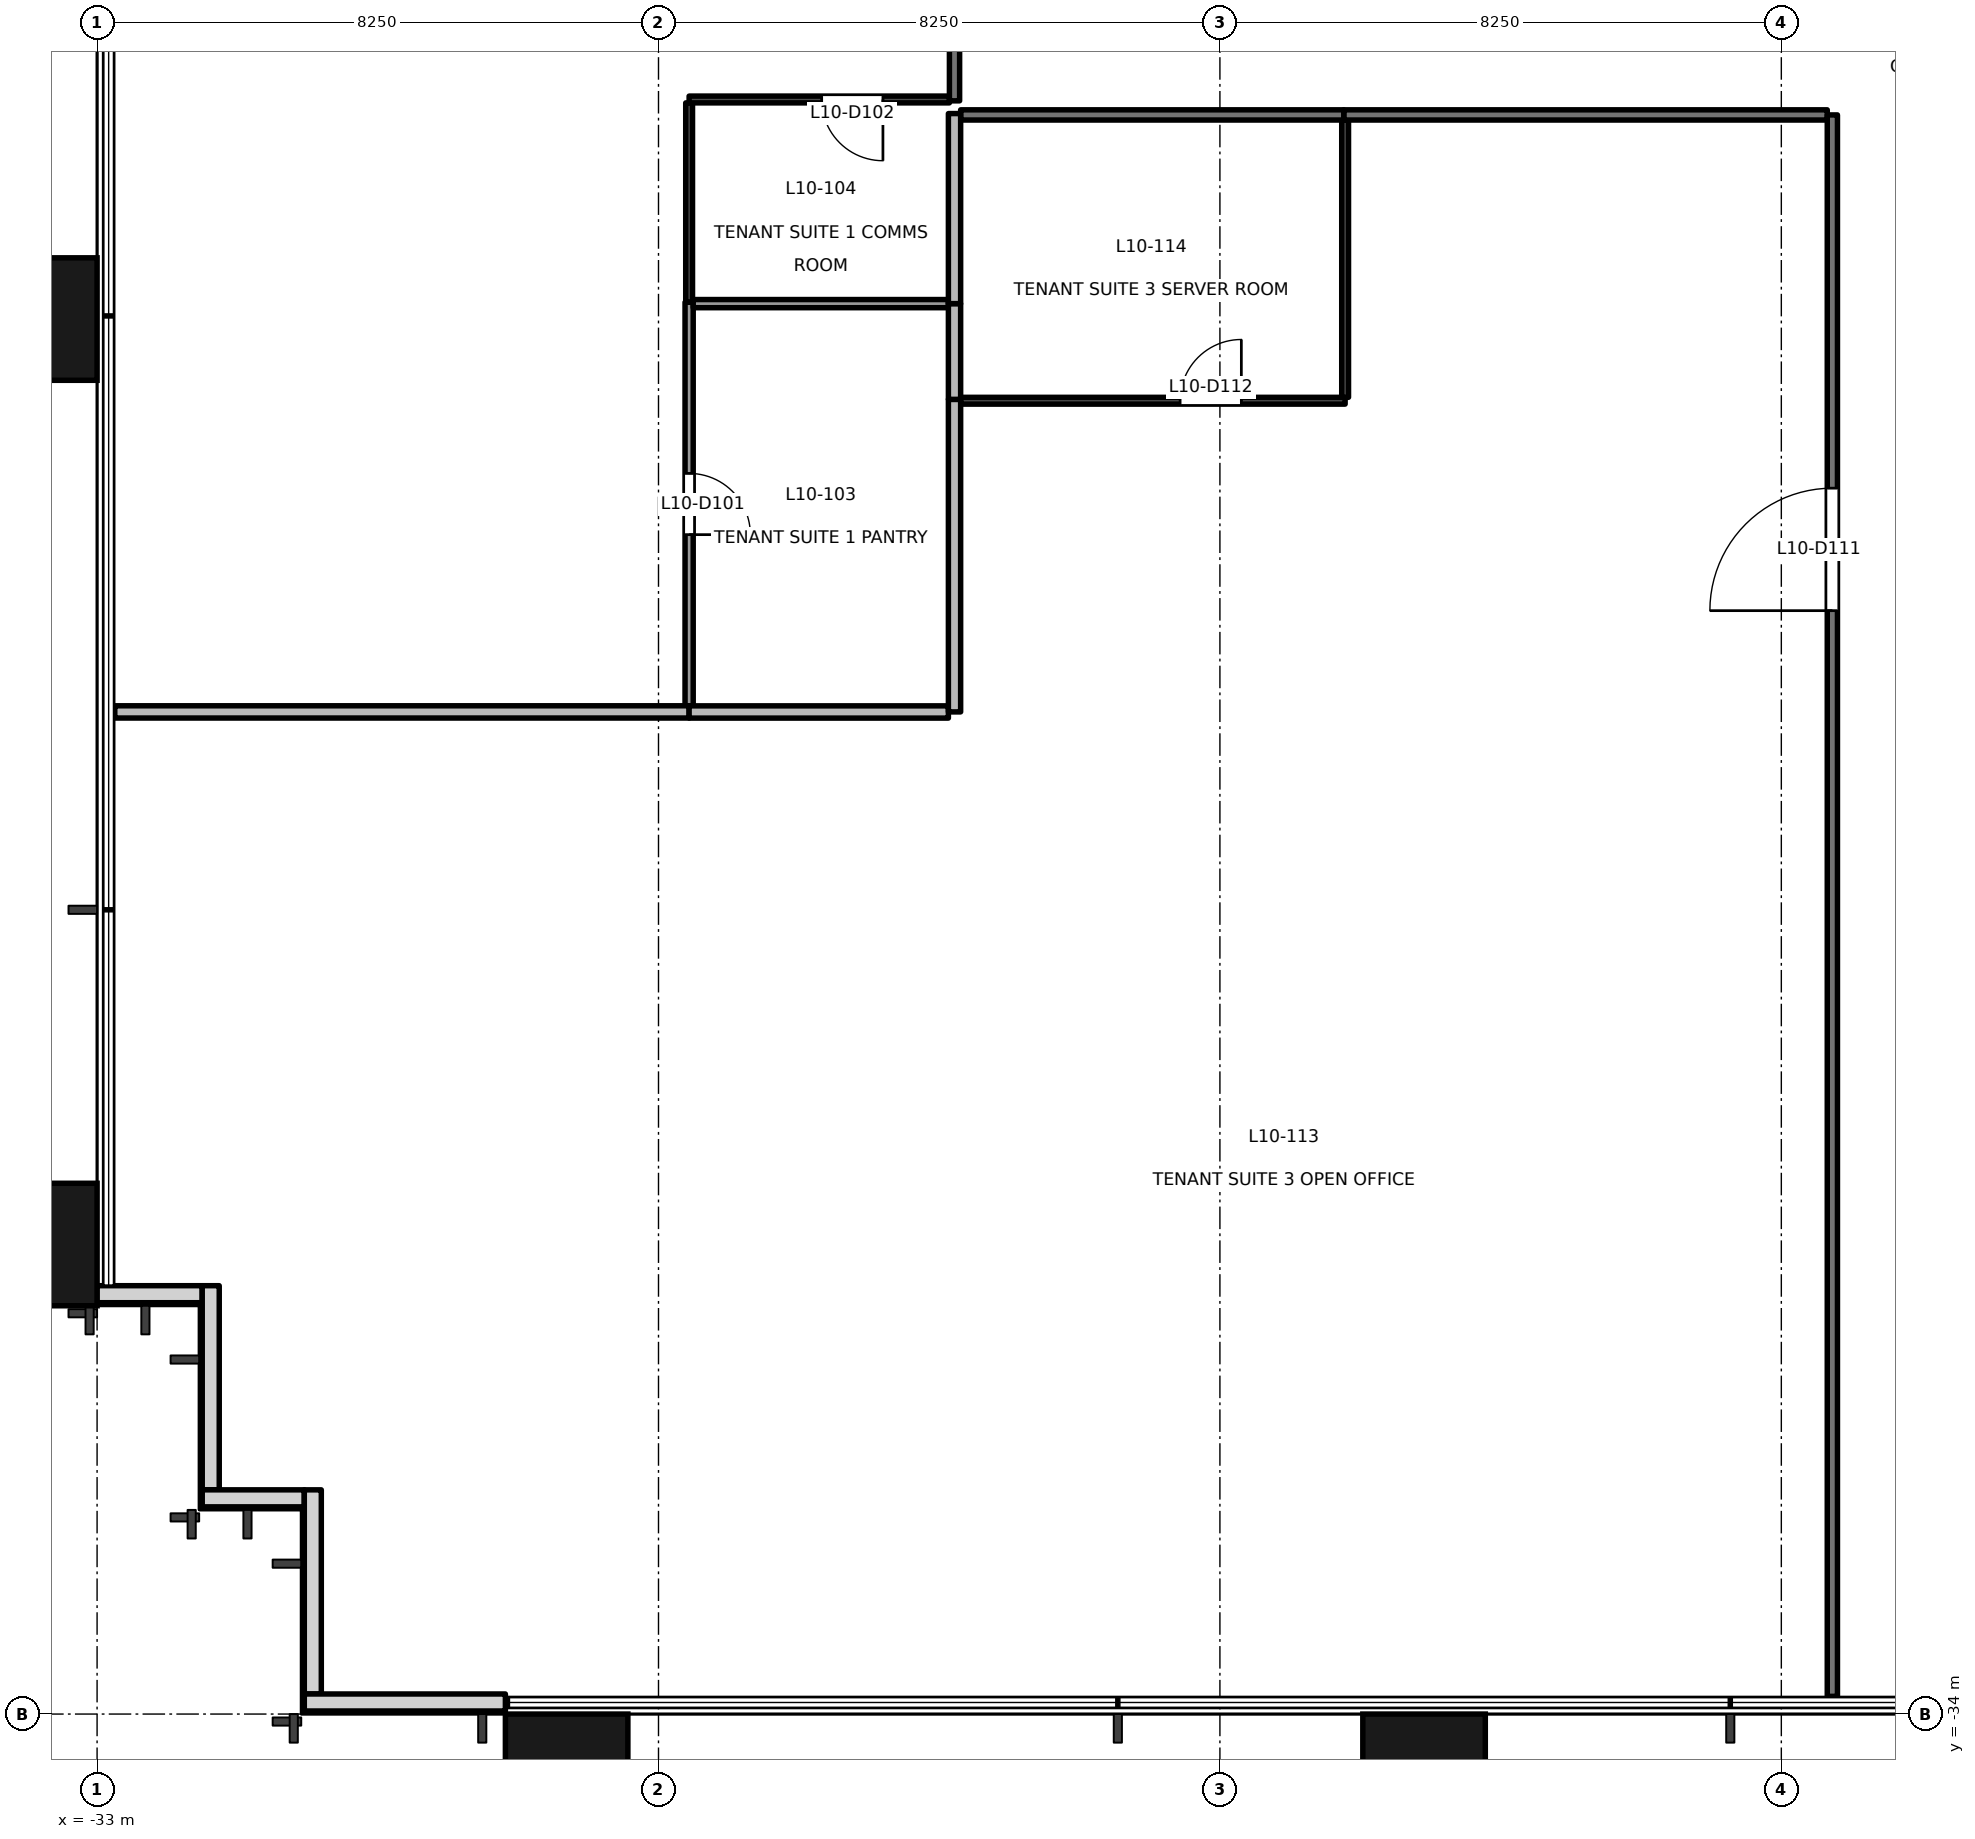
"""IFC4 building model, lengths in metres.
Left out: names, types, materials, properties, quantities, classifications, styles, units other than length and angle.
Written with IfcOpenShell. Run it as: python <this file> out.ifc"""

import sys

from ifc_helpers import new_model, si_unit, direction, frame, frame_2d, origin, origin_2d, place, context, subcontext, project, spatial, rectangle, extrude, element, fill, save


model = new_model("IFC4")
c1 = context("Model", 3, precision=1e-05, world=origin(), true_north=direction((0.0, 1.0)))
c2 = subcontext(c1, "Body", "Model", "MODEL_VIEW")
j1 = project(units=[si_unit("LENGTHUNIT", "METRE"), si_unit("PLANEANGLEUNIT", "RADIAN")], contexts=[c1])
p1 = place(None, origin())
s1 = spatial("IfcSite", under=j1, at=p1, CompositionType="ELEMENT")
p2 = place(p1, origin())
s2 = spatial("IfcBuilding", under=s1, at=p2, CompositionType="ELEMENT")
p3 = place(p2, frame((0.0, 0.0, 48.8)))
s3 = spatial("IfcBuildingStorey", under=s2, at=p3, CompositionType="ELEMENT", Elevation=48.8)
for number, where, z_axis, x_axis in (
    (1, (-26.1, -34.9, -0.2), (0.0, 0.0, 1.0), (1.0, 0.0, 0.0)),
    (2, (-13.5, -34.9, -0.2), (0.0, 0.0, 1.0), (1.0, 0.0, 0.0)),
    (3, (-33.9, -27.1, -0.2), (0.0, 0.0, 1.0), (0.0, 1.0, 0.0)),
    (4, (-33.9, -13.5, -0.2), (0.0, 0.0, 1.0), (0.0, 1.0, 0.0)),
):
    element("IfcColumn", number, at=place(p3, frame(where, z_axis=z_axis, x_axis=x_axis)), inside=s3, PredefinedType="COLUMN", context=c2, shape_type="SweptSolid", body=[
        extrude(rectangle(XDim=1.8, YDim=1.8, at=origin_2d()), origin(), (0.0, 0.0, 1.0), 4.1),
    ])
p4 = place(p3, frame((-33.005, -27.83, 0.0), z_axis=(0.0, 0.0, 1.0), x_axis=(1.0, 0.0, 0.0)))
e5 = element("IfcWall", 5, at=p4, inside=s3, PredefinedType="SOLIDWALL", context=c2, shape_type="SweptSolid", body=[
    extrude(rectangle(XDim=1.55, YDim=0.25, at=frame_2d((0.775, 0.0))), origin(), (0.0, 0.0, 1.0), 3.9),
])
p5 = place(p3, frame((-31.33, -27.705, 0.0), z_axis=(0.0, 0.0, 1.0), x_axis=(0.0, -1.0, 0.0)))
e6 = element("IfcWall", 6, at=p5, inside=s3, PredefinedType="SOLIDWALL", context=c2, shape_type="SweptSolid", body=[
    extrude(rectangle(XDim=3.0, YDim=0.25, at=frame_2d((1.5, 0.0))), origin(), (0.0, 0.0, 1.0), 3.9),
])
p6 = place(p3, frame((-31.455, -30.83, 0.0), z_axis=(0.0, 0.0, 1.0), x_axis=(1.0, 0.0, 0.0)))
e7 = element("IfcWall", 7, at=p6, inside=s3, PredefinedType="SOLIDWALL", context=c2, shape_type="SweptSolid", body=[
    extrude(rectangle(XDim=1.5, YDim=0.25, at=frame_2d((0.75, 0.0))), origin(), (0.0, 0.0, 1.0), 3.9),
])
p7 = place(p3, frame((-29.83, -30.705, 0.0), z_axis=(0.0, 0.0, 1.0), x_axis=(0.0, -1.0, 0.0)))
e8 = element("IfcWall", 8, at=p7, inside=s3, PredefinedType="SOLIDWALL", context=c2, shape_type="SweptSolid", body=[
    extrude(rectangle(XDim=3.0, YDim=0.25, at=frame_2d((1.5, 0.0))), origin(), (0.0, 0.0, 1.0), 3.9),
])
p8 = place(p3, frame((-29.955, -33.83, 0.0), z_axis=(0.0, 0.0, 1.0), x_axis=(1.0, 0.0, 0.0)))
e9 = element("IfcWall", 9, at=p8, inside=s3, PredefinedType="SOLIDWALL", context=c2, shape_type="SweptSolid", body=[
    extrude(rectangle(XDim=2.955, YDim=0.25, at=frame_2d((1.478, 0.0))), origin(), (0.0, 0.0, 1.0), 3.9),
])
p9 = place(p3, frame((-20.4, -10.293, 0.0), z_axis=(0.0, 0.0, 1.0), x_axis=(0.0, 1.0, 0.0)))
e10 = element("IfcWall", 10, at=p9, inside=s3, PredefinedType="PARTITIONING", context=c2, shape_type="SweptSolid", body=[
    extrude(rectangle(XDim=6.04, YDim=0.15, at=frame_2d((3.02, 0.0))), origin(), (0.0, 0.0, 1.0), 3.3),
])
p10 = place(p9, frame((2.12, 0.0, 0.0)))
e11 = element("IfcOpeningElement", 11, at=p10, cuts=e10, PredefinedType="OPENING", context=c2, shape_type="SweptSolid", body=[
    extrude(rectangle(XDim=1.8, YDim=2.1, at=frame_2d((0.9, 1.05))), frame((0.0, 0.085, 0.0), z_axis=(0.0, -1.0, 0.0), x_axis=(1.0, 0.0, 0.0)), (0.0, 0.0, 1.0), 0.171),
])
p11 = place(p3, frame((-7.575, -10.5, 0.0), z_axis=(0.0, 0.0, 1.0), x_axis=(-1.0, 0.0, 0.0)))
e12 = element("IfcWall", 12, at=p11, inside=s3, PredefinedType="PARTITIONING", context=c2, shape_type="SweptSolid", body=[
    extrude(rectangle(XDim=7.105, YDim=0.15, at=frame_2d((3.552, 0.0))), origin(), (0.0, 0.0, 1.0), 2.9),
])
p12 = place(p3, frame((-7.5, -33.74, 0.0), z_axis=(0.0, 0.0, 1.0), x_axis=(0.0, 1.0, 0.0)))
e13 = element("IfcWall", 13, at=p12, inside=s3, PredefinedType="PARTITIONING", context=c2, shape_type="SweptSolid", body=[
    extrude(rectangle(XDim=23.24, YDim=0.15, at=frame_2d((11.62, 0.0))), origin(), (0.0, 0.0, 1.0), 3.9),
])
p13 = place(p12, frame((15.955, 0.0, 0.0)))
e14 = element("IfcOpeningElement", 14, at=p13, cuts=e13, PredefinedType="OPENING", context=c2, shape_type="SweptSolid", body=[
    extrude(rectangle(XDim=1.8, YDim=2.1, at=frame_2d((0.9, 1.05))), frame((0.0, 0.085, 0.0), z_axis=(0.0, -1.0, 0.0), x_axis=(1.0, 0.0, 0.0)), (0.0, 0.0, 1.0), 0.171),
])
p14 = place(p3, frame((-14.68, -10.5, 0.0), z_axis=(0.0, 0.0, 1.0), x_axis=(-1.0, 0.0, 0.0)))
e15 = element("IfcWall", 15, at=p14, inside=s3, PredefinedType="PARTITIONING", context=c2, shape_type="SweptSolid", body=[
    extrude(rectangle(XDim=5.63, YDim=0.15, at=frame_2d((2.815, 0.0))), origin(), (0.0, 0.0, 1.0), 2.5),
])
p15 = place(p3, frame((-24.3, -13.253, 0.0), z_axis=(0.0, 0.0, 1.0), x_axis=(0.0, -1.0, 0.0)))
e16 = element("IfcWall", 16, at=p15, inside=s3, PredefinedType="PARTITIONING", context=c2, shape_type="SweptSolid", body=[
    extrude(rectangle(XDim=5.93, YDim=0.12, at=frame_2d((2.965, 0.0))), origin(), (0.0, 0.0, 1.0), 3.3),
])
p16 = place(p15, frame((2.515, 0.0, 0.0)))
e17 = element("IfcOpeningElement", 17, at=p16, cuts=e16, PredefinedType="OPENING", context=c2, shape_type="SweptSolid", body=[
    extrude(rectangle(XDim=0.9, YDim=2.1, at=frame_2d((0.45, 1.05))), frame((0.0, 0.071, 0.0), z_axis=(0.0, -1.0, 0.0), x_axis=(1.0, 0.0, 0.0)), (0.0, 0.0, 1.0), 0.141),
])
p17 = place(p3, frame((-24.3, -10.323, 0.0), z_axis=(0.0, 0.0, 1.0), x_axis=(0.0, -1.0, 0.0)))
e18 = element("IfcWall", 18, at=p17, inside=s3, PredefinedType="PARTITIONING", context=c2, shape_type="SweptSolid", body=[
    extrude(rectangle(XDim=2.93, YDim=0.1, at=frame_2d((1.465, 0.0))), origin(), (0.0, 0.0, 1.0), 3.9),
])
p18 = place(p3, frame((-20.475, -10.273, 0.0), z_axis=(0.0, 0.0, 1.0), x_axis=(-1.0, 0.0, 0.0)))
e19 = element("IfcWall", 19, at=p18, inside=s3, PredefinedType="PARTITIONING", context=c2, shape_type="SweptSolid", body=[
    extrude(rectangle(XDim=3.825, YDim=0.1, at=frame_2d((1.913, 0.0))), origin(), (0.0, 0.0, 1.0), 3.9),
])
p19 = place(p18, frame((0.977, 0.0, 0.0)))
e20 = element("IfcOpeningElement", 20, at=p19, cuts=e19, PredefinedType="OPENING", context=c2, shape_type="SweptSolid", body=[
    extrude(rectangle(XDim=0.9, YDim=2.1, at=frame_2d((0.45, 1.05))), frame((0.0, 0.061, 0.0), z_axis=(0.0, -1.0, 0.0), x_axis=(1.0, 0.0, 0.0)), (0.0, 0.0, 1.0), 0.121),
])
p20 = place(p3, frame((-24.3, -19.273, 0.0), z_axis=(0.0, 0.0, 1.0), x_axis=(-1.0, 0.0, 0.0)))
e21 = element("IfcWall", 21, at=p20, inside=s3, PredefinedType="PARTITIONING", context=c2, shape_type="SweptSolid", body=[
    extrude(rectangle(XDim=8.44, YDim=0.18, at=frame_2d((4.22, 0.0))), origin(), (0.0, 0.0, 1.0), 3.9),
])
p21 = place(p3, frame((-24.24, -13.273, 0.0), z_axis=(0.0, 0.0, 1.0), x_axis=(1.0, 0.0, 0.0)))
e22 = element("IfcWall", 22, at=p21, inside=s3, PredefinedType="PARTITIONING", context=c2, shape_type="SweptSolid", body=[
    extrude(rectangle(XDim=3.75, YDim=0.12, at=frame_2d((1.875, 0.0))), origin(), (0.0, 0.0, 1.0), 3.9),
])
p22 = place(p3, frame((-20.49, -19.274, 0.0), z_axis=(0.0, 0.0, 1.0), x_axis=(-1.0, 0.0, 0.0)))
e23 = element("IfcWall", 23, at=p22, inside=s3, PredefinedType="PARTITIONING", context=c2, shape_type="SweptSolid", body=[
    extrude(rectangle(XDim=3.81, YDim=0.18, at=frame_2d((1.905, 0.0))), origin(), (0.0, 0.0, 1.0), 3.9),
])
p23 = place(p3, frame((-20.4, -14.68, 0.0), z_axis=(0.0, 0.0, 1.0), x_axis=(0.0, -1.0, 0.0)))
e24 = element("IfcWall", 24, at=p23, inside=s3, PredefinedType="PARTITIONING", context=c2, shape_type="SweptSolid", body=[
    extrude(rectangle(XDim=4.593, YDim=0.18, at=frame_2d((2.296, 0.0))), origin(), (0.0, 0.0, 1.0), 3.3),
])
p24 = place(p3, frame((-20.4, -13.273, 0.0), z_axis=(0.0, 0.0, 1.0), x_axis=(0.0, -1.0, 0.0)))
e25 = element("IfcWall", 25, at=p24, inside=s3, PredefinedType="PARTITIONING", context=c2, shape_type="SweptSolid", body=[
    extrude(rectangle(XDim=1.407, YDim=0.18, at=frame_2d((0.704, 0.0))), origin(), (0.0, 0.0, 1.0), 3.3),
])
p25 = place(p3, frame((-20.4, -10.48, 0.0), z_axis=(0.0, 0.0, 1.0), x_axis=(0.0, -1.0, 0.0)))
e26 = element("IfcWall", 26, at=p25, inside=s3, PredefinedType="PARTITIONING", context=c2, shape_type="SweptSolid", body=[
    extrude(rectangle(XDim=2.793, YDim=0.18, at=frame_2d((1.396, 0.0))), origin(), (0.0, 0.0, 1.0), 3.9),
])
p26 = place(p3, frame((-20.31, -14.7, 0.0), z_axis=(0.0, 0.0, 1.0), x_axis=(1.0, 0.0, 0.0)))
e27 = element("IfcWall", 27, at=p26, inside=s3, PredefinedType="PARTITIONING", context=c2, shape_type="SweptSolid", body=[
    extrude(rectangle(XDim=5.65, YDim=0.1, at=frame_2d((2.825, 0.0))), origin(), (0.0, 0.0, 1.0), 2.5),
])
p27 = place(p26, frame((3.225, 0.0, 0.0)))
e28 = element("IfcOpeningElement", 28, at=p27, cuts=e27, PredefinedType="OPENING", context=c2, shape_type="SweptSolid", body=[
    extrude(rectangle(XDim=0.9, YDim=2.1, at=frame_2d((0.45, 1.05))), frame((0.0, 0.061, 0.0), z_axis=(0.0, -1.0, 0.0), x_axis=(1.0, 0.0, 0.0)), (0.0, 0.0, 1.0), 0.121),
])
p28 = place(p3, frame((-14.66, -14.65, 0.0), z_axis=(0.0, 0.0, 1.0), x_axis=(0.0, 1.0, 0.0)))
e29 = element("IfcWall", 29, at=p28, inside=s3, PredefinedType="PARTITIONING", context=c2, shape_type="SweptSolid", body=[
    extrude(rectangle(XDim=4.075, YDim=0.1, at=frame_2d((2.038, 0.0))), origin(), (0.0, 0.0, 1.0), 3.9),
])
p29 = place(p16, origin())
e30 = element("IfcDoor", 30, at=p29, inside=s3, OperationType="SINGLE_SWING_RIGHT", PredefinedType="DOOR", context=c2, shape_type="SweptSolid", body=[
    extrude(rectangle(XDim=0.9, YDim=2.1, at=frame_2d((0.45, 1.05))), frame((0.0, 0.025, 0.0), z_axis=(0.0, -1.0, 0.0), x_axis=(1.0, 0.0, 0.0)), (0.0, 0.0, 1.0), 0.05),
])
fill(e17, e30)
p30 = place(p19, origin())
e31 = element("IfcDoor", 31, at=p30, inside=s3, OperationType="SINGLE_SWING_LEFT", PredefinedType="DOOR", context=c2, shape_type="SweptSolid", body=[
    extrude(rectangle(XDim=0.9, YDim=2.1, at=frame_2d((0.45, 1.05))), frame((0.0, 0.025, 0.0), z_axis=(0.0, -1.0, 0.0), x_axis=(1.0, 0.0, 0.0)), (0.0, 0.0, 1.0), 0.05),
])
fill(e20, e31)
p31 = place(p13, origin())
e32 = element("IfcDoor", 32, at=p31, inside=s3, OperationType="DOUBLE_DOOR_SINGLE_SWING", PredefinedType="DOOR", context=c2, shape_type="SweptSolid", body=[
    extrude(rectangle(XDim=1.8, YDim=2.1, at=frame_2d((0.9, 1.05))), frame((0.0, 0.025, 0.0), z_axis=(0.0, -1.0, 0.0), x_axis=(1.0, 0.0, 0.0)), (0.0, 0.0, 1.0), 0.05),
])
fill(e14, e32)
p32 = place(p27, origin())
e33 = element("IfcDoor", 33, at=p32, inside=s3, OperationType="SINGLE_SWING_RIGHT", PredefinedType="DOOR", context=c2, shape_type="SweptSolid", body=[
    extrude(rectangle(XDim=0.9, YDim=2.1, at=frame_2d((0.45, 1.05))), frame((0.0, 0.025, 0.0), z_axis=(0.0, -1.0, 0.0), x_axis=(1.0, 0.0, 0.0)), (0.0, 0.0, 1.0), 0.05),
])
fill(e28, e33)
save(model, sys.argv[1])
